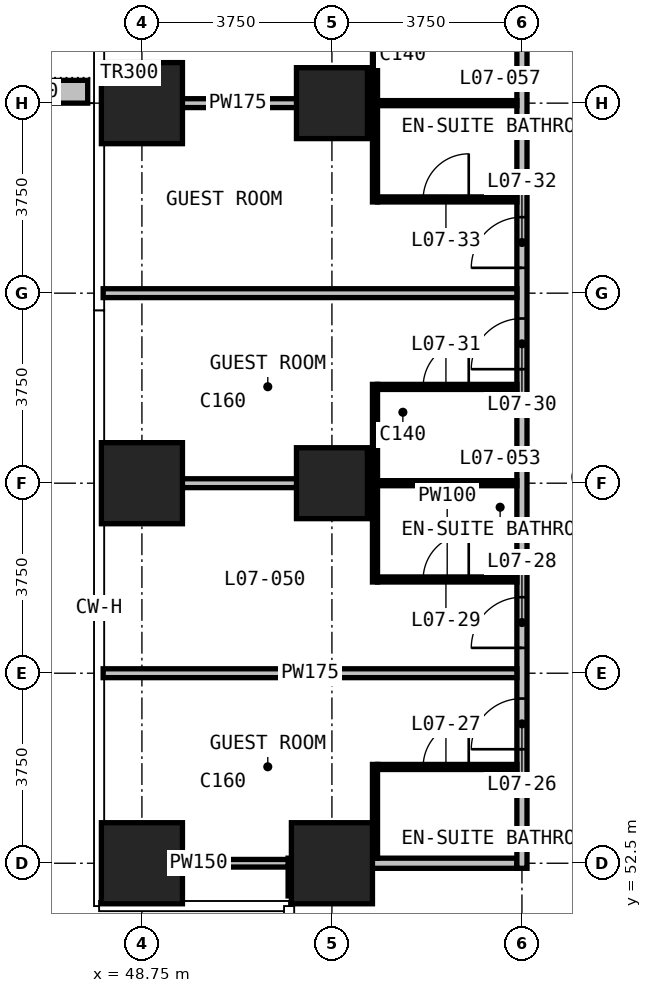
"""IFC4 building model, lengths in metres.
Left out: names, types, materials, properties, quantities, classifications, styles, units other than length and angle.
Written with IfcOpenShell. Run it as: python <this file> out.ifc"""

import sys

from ifc_helpers import new_model, si_unit, direction, frame, frame_2d, origin, origin_2d, place, context, subcontext, project, spatial, rectangle, extrude, element, fill, save


model = new_model("IFC4")
c1 = context("Model", 3, precision=1e-05, world=origin(), true_north=direction((0.0, 1.0)))
c2 = subcontext(c1, "Body", "Model", "MODEL_VIEW")
j1 = project(units=[si_unit("LENGTHUNIT", "METRE"), si_unit("PLANEANGLEUNIT", "RADIAN")], contexts=[c1])
p1 = place(None, origin())
s1 = spatial("IfcSite", under=j1, at=p1, CompositionType="ELEMENT")
p2 = place(p1, origin())
s2 = spatial("IfcBuilding", under=s1, at=p2, CompositionType="ELEMENT")
p3 = place(p2, frame((0.0, 0.0, 42.8)))
s3 = spatial("IfcBuildingStorey", under=s2, at=p3, CompositionType="ELEMENT", Elevation=42.8)
for number, where, z_axis, x_axis in (
    (1, (48.75, 52.5, 0.0), (0.0, 0.0, 1.0), (1.0, 0.0, 0.0)),
    (2, (48.75, 60.0, 0.0), (0.0, 0.0, 1.0), (1.0, 0.0, 0.0)),
    (3, (48.75, 67.5, 0.0), (0.0, 0.0, 1.0), (1.0, 0.0, 0.0)),
    (4, (52.5, 52.5, 0.0), (0.0, 0.0, 1.0), (1.0, 0.0, 0.0)),
):
    element("IfcColumn", number, at=place(p3, frame(where, z_axis=z_axis, x_axis=x_axis)), inside=s3, PredefinedType="COLUMN", context=c2, shape_type="SweptSolid", body=[
        extrude(rectangle(XDim=1.6, YDim=1.6, at=origin_2d()), origin(), (0.0, 0.0, 1.0), 3.3),
    ])
for number, where, z_axis, x_axis in (
    (5, (52.5, 60.0, 0.0), (0.0, 0.0, 1.0), (1.0, 0.0, 0.0)),
    (6, (52.5, 67.5, 0.0), (0.0, 0.0, 1.0), (1.0, 0.0, 0.0)),
):
    element("IfcColumn", number, at=place(p3, frame(where, z_axis=z_axis, x_axis=x_axis)), inside=s3, PredefinedType="COLUMN", context=c2, shape_type="SweptSolid", body=[
        extrude(rectangle(XDim=1.4, YDim=1.4, at=origin_2d()), origin(), (0.0, 0.0, 1.0), 3.3),
    ])
p4 = place(p3, frame((47.68, 67.725, 0.0), z_axis=(0.0, 0.0, 1.0), x_axis=(-1.0, 0.0, 0.0)))
e7 = element("IfcWall", 7, at=p4, inside=s3, PredefinedType="USERDEFINED", context=c2, shape_type="SweptSolid", body=[
    extrude(rectangle(XDim=2.33, YDim=0.45, at=frame_2d((1.165, 0.0))), origin(), (0.0, 0.0, 1.0), 1.1),
])
p5 = place(p3, frame((51.835, 52.5, 0.0), z_axis=(0.0, 0.0, 1.0), x_axis=(1.0, 0.0, 0.0)))
e8 = element("IfcWall", 8, at=p5, inside=s3, PredefinedType="PARTITIONING", context=c2, shape_type="SweptSolid", body=[
    extrude(rectangle(XDim=4.315, YDim=0.2, at=frame_2d((2.157, 0.0))), origin(), (0.0, 0.0, 1.0), 3.0),
])
p6 = place(p3, frame((51.735, 51.855, 0.0), z_axis=(0.0, 0.0, 1.0), x_axis=(0.0, 1.0, 0.0)))
e9 = element("IfcWall", 9, at=p6, inside=s3, PredefinedType="PARTITIONING", context=c2, shape_type="SweptSolid", body=[
    extrude(rectangle(XDim=0.745, YDim=0.2, at=frame_2d((0.373, 0.0))), origin(), (0.0, 0.0, 1.0), 3.0),
])
p7 = place(p3, frame((56.25, 52.4, 0.0), z_axis=(0.0, 0.0, 1.0), x_axis=(0.0, 1.0, 0.0)))
e10 = element("IfcWall", 10, at=p7, inside=s3, PredefinedType="PARTITIONING", context=c2, shape_type="SweptSolid", body=[
    extrude(rectangle(XDim=33.925, YDim=0.2, at=frame_2d((16.962, 0.0))), origin(), (0.0, 0.0, 1.0), 3.0),
])
p8 = place(p7, frame((2.35, 0.0, 0.0)))
e11 = element("IfcOpeningElement", 11, at=p8, cuts=e10, PredefinedType="OPENING", context=c2, shape_type="SweptSolid", body=[
    extrude(rectangle(XDim=1.0, YDim=2.2, at=frame_2d((0.5, 1.1))), frame((0.0, 0.11, 0.0), z_axis=(0.0, -1.0, 0.0), x_axis=(1.0, 0.0, 0.0)), (0.0, 0.0, 1.0), 0.22),
])
p9 = place(p7, frame((4.35, 0.0, 0.0)))
e12 = element("IfcOpeningElement", 12, at=p9, cuts=e10, PredefinedType="OPENING", context=c2, shape_type="SweptSolid", body=[
    extrude(rectangle(XDim=1.0, YDim=2.2, at=frame_2d((0.5, 1.1))), frame((0.0, 0.11, 0.0), z_axis=(0.0, -1.0, 0.0), x_axis=(1.0, 0.0, 0.0)), (0.0, 0.0, 1.0), 0.22),
])
p10 = place(p7, frame((9.85, 0.0, 0.0)))
e13 = element("IfcOpeningElement", 13, at=p10, cuts=e10, PredefinedType="OPENING", context=c2, shape_type="SweptSolid", body=[
    extrude(rectangle(XDim=1.0, YDim=2.2, at=frame_2d((0.5, 1.1))), frame((0.0, 0.11, 0.0), z_axis=(0.0, -1.0, 0.0), x_axis=(1.0, 0.0, 0.0)), (0.0, 0.0, 1.0), 0.22),
])
p11 = place(p7, frame((11.85, 0.0, 0.0)))
e14 = element("IfcOpeningElement", 14, at=p11, cuts=e10, PredefinedType="OPENING", context=c2, shape_type="SweptSolid", body=[
    extrude(rectangle(XDim=1.0, YDim=2.2, at=frame_2d((0.5, 1.1))), frame((0.0, 0.11, 0.0), z_axis=(0.0, -1.0, 0.0), x_axis=(1.0, 0.0, 0.0)), (0.0, 0.0, 1.0), 0.22),
])
p12 = place(p7, frame((17.35, 0.0, 0.0)))
e15 = element("IfcOpeningElement", 15, at=p12, cuts=e10, PredefinedType="OPENING", context=c2, shape_type="SweptSolid", body=[
    extrude(rectangle(XDim=1.0, YDim=2.2, at=frame_2d((0.5, 1.1))), frame((0.0, 0.11, 0.0), z_axis=(0.0, -1.0, 0.0), x_axis=(1.0, 0.0, 0.0)), (0.0, 0.0, 1.0), 0.22),
])
p13 = place(p7, frame((19.35, 0.0, 0.0)))
e16 = element("IfcOpeningElement", 16, at=p13, cuts=e10, PredefinedType="OPENING", context=c2, shape_type="SweptSolid", body=[
    extrude(rectangle(XDim=1.0, YDim=2.2, at=frame_2d((0.5, 1.1))), frame((0.0, 0.11, 0.0), z_axis=(0.0, -1.0, 0.0), x_axis=(1.0, 0.0, 0.0)), (0.0, 0.0, 1.0), 0.22),
])
p14 = place(p7, frame((24.85, 0.0, 0.0)))
e17 = element("IfcOpeningElement", 17, at=p14, cuts=e10, PredefinedType="OPENING", context=c2, shape_type="SweptSolid", body=[
    extrude(rectangle(XDim=1.0, YDim=2.2, at=frame_2d((0.5, 1.1))), frame((0.0, 0.11, 0.0), z_axis=(0.0, -1.0, 0.0), x_axis=(1.0, 0.0, 0.0)), (0.0, 0.0, 1.0), 0.22),
])
p15 = place(p7, frame((26.85, 0.0, 0.0)))
e18 = element("IfcOpeningElement", 18, at=p15, cuts=e10, PredefinedType="OPENING", context=c2, shape_type="SweptSolid", body=[
    extrude(rectangle(XDim=1.0, YDim=2.2, at=frame_2d((0.5, 1.1))), frame((0.0, 0.11, 0.0), z_axis=(0.0, -1.0, 0.0), x_axis=(1.0, 0.0, 0.0)), (0.0, 0.0, 1.0), 0.22),
])
p16 = place(p7, frame((31.55, 0.0, 0.0)))
e19 = element("IfcOpeningElement", 19, at=p16, cuts=e10, PredefinedType="OPENING", context=c2, shape_type="SweptSolid", body=[
    extrude(rectangle(XDim=0.9, YDim=2.2, at=frame_2d((0.45, 1.1))), frame((0.0, 0.11, 0.0), z_axis=(0.0, -1.0, 0.0), x_axis=(1.0, 0.0, 0.0)), (0.0, 0.0, 1.0), 0.22),
])
p17 = place(p3, frame((47.985, 56.25, 0.0), z_axis=(0.0, 0.0, 1.0), x_axis=(1.0, 0.0, 0.0)))
e20 = element("IfcWall", 20, at=p17, inside=s3, PredefinedType="PARTITIONING", context=c2, shape_type="SweptSolid", body=[
    extrude(rectangle(XDim=8.165, YDim=0.175, at=frame_2d((4.083, 0.0))), origin(), (0.0, 0.0, 1.0), 3.0),
])
p18 = place(p3, frame((47.985, 60.0, 0.0), z_axis=(0.0, 0.0, 1.0), x_axis=(1.0, 0.0, 0.0)))
e21 = element("IfcWall", 21, at=p18, inside=s3, PredefinedType="PARTITIONING", context=c2, shape_type="SweptSolid", body=[
    extrude(rectangle(XDim=5.315, YDim=0.175, at=frame_2d((2.657, 0.0))), origin(), (0.0, 0.0, 1.0), 3.0),
])
p19 = place(p3, frame((47.985, 63.75, 0.0), z_axis=(0.0, 0.0, 1.0), x_axis=(1.0, 0.0, 0.0)))
e22 = element("IfcWall", 22, at=p19, inside=s3, PredefinedType="PARTITIONING", context=c2, shape_type="SweptSolid", body=[
    extrude(rectangle(XDim=8.165, YDim=0.175, at=frame_2d((4.083, 0.0))), origin(), (0.0, 0.0, 1.0), 3.0),
])
p20 = place(p3, frame((47.985, 67.5, 0.0), z_axis=(0.0, 0.0, 1.0), x_axis=(1.0, 0.0, 0.0)))
e23 = element("IfcWall", 23, at=p20, inside=s3, PredefinedType="PARTITIONING", context=c2, shape_type="SweptSolid", body=[
    extrude(rectangle(XDim=5.315, YDim=0.175, at=frame_2d((2.657, 0.0))), origin(), (0.0, 0.0, 1.0), 3.0),
])
p21 = place(p3, frame((48.105, 52.5, 0.0), z_axis=(0.0, 0.0, 1.0), x_axis=(1.0, 0.0, 0.0)))
e24 = element("IfcWall", 24, at=p21, inside=s3, PredefinedType="PARTITIONING", context=c2, shape_type="SweptSolid", body=[
    extrude(rectangle(XDim=3.53, YDim=0.15, at=frame_2d((1.765, 0.0))), origin(), (0.0, 0.0, 1.0), 3.0),
])
p22 = place(p3, frame((53.4, 54.4, 0.0), z_axis=(0.0, 0.0, 1.0), x_axis=(1.0, 0.0, 0.0)))
e25 = element("IfcWall", 25, at=p22, inside=s3, PredefinedType="PARTITIONING", context=c2, shape_type="SweptSolid", body=[
    extrude(rectangle(XDim=2.75, YDim=0.1, at=frame_2d((1.375, 0.0))), origin(), (0.0, 0.0, 1.0), 3.0),
])
p23 = place(p22, frame((0.9, 0.0, 0.0)))
e26 = element("IfcOpeningElement", 26, at=p23, cuts=e25, PredefinedType="OPENING", context=c2, shape_type="SweptSolid", body=[
    extrude(rectangle(XDim=0.9, YDim=2.2, at=frame_2d((0.45, 1.1))), frame((0.0, 0.06, 0.0), z_axis=(0.0, -1.0, 0.0), x_axis=(1.0, 0.0, 0.0)), (0.0, 0.0, 1.0), 0.12),
])
p24 = place(p3, frame((53.4, 58.1, 0.0), z_axis=(0.0, 0.0, 1.0), x_axis=(1.0, 0.0, 0.0)))
e27 = element("IfcWall", 27, at=p24, inside=s3, PredefinedType="PARTITIONING", context=c2, shape_type="SweptSolid", body=[
    extrude(rectangle(XDim=2.75, YDim=0.1, at=frame_2d((1.375, 0.0))), origin(), (0.0, 0.0, 1.0), 3.0),
])
p25 = place(p24, frame((0.9, 0.0, 0.0)))
e28 = element("IfcOpeningElement", 28, at=p25, cuts=e27, PredefinedType="OPENING", context=c2, shape_type="SweptSolid", body=[
    extrude(rectangle(XDim=0.9, YDim=2.2, at=frame_2d((0.45, 1.1))), frame((0.0, 0.06, 0.0), z_axis=(0.0, -1.0, 0.0), x_axis=(1.0, 0.0, 0.0)), (0.0, 0.0, 1.0), 0.12),
])
p26 = place(p3, frame((53.4, 60.0, 0.0), z_axis=(0.0, 0.0, 1.0), x_axis=(1.0, 0.0, 0.0)))
e29 = element("IfcWall", 29, at=p26, inside=s3, PredefinedType="PARTITIONING", context=c2, shape_type="SweptSolid", body=[
    extrude(rectangle(XDim=2.75, YDim=0.1, at=frame_2d((1.375, 0.0))), origin(), (0.0, 0.0, 1.0), 3.0),
])
p27 = place(p3, frame((53.4, 61.9, 0.0), z_axis=(0.0, 0.0, 1.0), x_axis=(1.0, 0.0, 0.0)))
e30 = element("IfcWall", 30, at=p27, inside=s3, PredefinedType="PARTITIONING", context=c2, shape_type="SweptSolid", body=[
    extrude(rectangle(XDim=2.75, YDim=0.1, at=frame_2d((1.375, 0.0))), origin(), (0.0, 0.0, 1.0), 3.0),
])
p28 = place(p27, frame((0.9, 0.0, 0.0)))
e31 = element("IfcOpeningElement", 31, at=p28, cuts=e30, PredefinedType="OPENING", context=c2, shape_type="SweptSolid", body=[
    extrude(rectangle(XDim=0.9, YDim=2.2, at=frame_2d((0.45, 1.1))), frame((0.0, 0.06, 0.0), z_axis=(0.0, -1.0, 0.0), x_axis=(1.0, 0.0, 0.0)), (0.0, 0.0, 1.0), 0.12),
])
p29 = place(p3, frame((53.4, 65.6, 0.0), z_axis=(0.0, 0.0, 1.0), x_axis=(1.0, 0.0, 0.0)))
e32 = element("IfcWall", 32, at=p29, inside=s3, PredefinedType="PARTITIONING", context=c2, shape_type="SweptSolid", body=[
    extrude(rectangle(XDim=2.75, YDim=0.1, at=frame_2d((1.375, 0.0))), origin(), (0.0, 0.0, 1.0), 3.0),
])
p30 = place(p29, frame((0.9, 0.0, 0.0)))
e33 = element("IfcOpeningElement", 33, at=p30, cuts=e32, PredefinedType="OPENING", context=c2, shape_type="SweptSolid", body=[
    extrude(rectangle(XDim=0.9, YDim=2.2, at=frame_2d((0.45, 1.1))), frame((0.0, 0.06, 0.0), z_axis=(0.0, -1.0, 0.0), x_axis=(1.0, 0.0, 0.0)), (0.0, 0.0, 1.0), 0.12),
])
p31 = place(p3, frame((53.4, 67.5, 0.0), z_axis=(0.0, 0.0, 1.0), x_axis=(1.0, 0.0, 0.0)))
e34 = element("IfcWall", 34, at=p31, inside=s3, PredefinedType="PARTITIONING", context=c2, shape_type="SweptSolid", body=[
    extrude(rectangle(XDim=2.75, YDim=0.1, at=frame_2d((1.375, 0.0))), origin(), (0.0, 0.0, 1.0), 3.0),
])
p32 = place(p3, frame((53.35, 52.6, 0.0), z_axis=(0.0, 0.0, 1.0), x_axis=(0.0, 1.0, 0.0)))
e35 = element("IfcWall", 35, at=p32, inside=s3, PredefinedType="PARTITIONING", context=c2, shape_type="SweptSolid", body=[
    extrude(rectangle(XDim=1.85, YDim=0.1, at=frame_2d((0.925, 0.0))), origin(), (0.0, 0.0, 1.0), 3.0),
])
for number, where, z_axis, x_axis in (
    (36, (53.35, 58.05, 0.0), (0.0, 0.0, 1.0), (0.0, 1.0, 0.0)),
    (37, (53.35, 65.55, 0.0), (0.0, 0.0, 1.0), (0.0, 1.0, 0.0)),
):
    element("IfcWall", number, at=place(p3, frame(where, z_axis=z_axis, x_axis=x_axis)), inside=s3, PredefinedType="PARTITIONING", context=c2, shape_type="SweptSolid", body=[
        extrude(rectangle(XDim=3.9, YDim=0.1, at=frame_2d((1.95, 0.0))), origin(), (0.0, 0.0, 1.0), 3.0),
    ])
p33 = place(p8, origin())
e38 = element("IfcDoor", 38, at=p33, inside=s3, OperationType="SINGLE_SWING_LEFT", PredefinedType="DOOR", context=c2, shape_type="SweptSolid", body=[
    extrude(rectangle(XDim=1.0, YDim=2.2, at=frame_2d((0.5, 1.1))), frame((0.0, 0.025, 0.0), z_axis=(0.0, -1.0, 0.0), x_axis=(1.0, 0.0, 0.0)), (0.0, 0.0, 1.0), 0.05),
])
fill(e11, e38)
p34 = place(p23, origin())
e39 = element("IfcDoor", 39, at=p34, inside=s3, OperationType="SINGLE_SWING_RIGHT", PredefinedType="DOOR", context=c2, shape_type="SweptSolid", body=[
    extrude(rectangle(XDim=0.9, YDim=2.2, at=frame_2d((0.45, 1.1))), frame((0.0, 0.025, 0.0), z_axis=(0.0, -1.0, 0.0), x_axis=(1.0, 0.0, 0.0)), (0.0, 0.0, 1.0), 0.05),
])
fill(e26, e39)
p35 = place(p9, origin())
e40 = element("IfcDoor", 40, at=p35, inside=s3, OperationType="SINGLE_SWING_RIGHT", PredefinedType="DOOR", context=c2, shape_type="SweptSolid", body=[
    extrude(rectangle(XDim=1.0, YDim=2.2, at=frame_2d((0.5, 1.1))), frame((0.0, 0.025, 0.0), z_axis=(0.0, -1.0, 0.0), x_axis=(1.0, 0.0, 0.0)), (0.0, 0.0, 1.0), 0.05),
])
fill(e12, e40)
p36 = place(p25, origin())
e41 = element("IfcDoor", 41, at=p36, inside=s3, OperationType="SINGLE_SWING_RIGHT", PredefinedType="DOOR", context=c2, shape_type="SweptSolid", body=[
    extrude(rectangle(XDim=0.9, YDim=2.2, at=frame_2d((0.45, 1.1))), frame((0.0, 0.025, 0.0), z_axis=(0.0, -1.0, 0.0), x_axis=(1.0, 0.0, 0.0)), (0.0, 0.0, 1.0), 0.05),
])
fill(e28, e41)
p37 = place(p10, origin())
e42 = element("IfcDoor", 42, at=p37, inside=s3, OperationType="SINGLE_SWING_LEFT", PredefinedType="DOOR", context=c2, shape_type="SweptSolid", body=[
    extrude(rectangle(XDim=1.0, YDim=2.2, at=frame_2d((0.5, 1.1))), frame((0.0, 0.025, 0.0), z_axis=(0.0, -1.0, 0.0), x_axis=(1.0, 0.0, 0.0)), (0.0, 0.0, 1.0), 0.05),
])
fill(e13, e42)
p38 = place(p28, origin())
e43 = element("IfcDoor", 43, at=p38, inside=s3, OperationType="SINGLE_SWING_RIGHT", PredefinedType="DOOR", context=c2, shape_type="SweptSolid", body=[
    extrude(rectangle(XDim=0.9, YDim=2.2, at=frame_2d((0.45, 1.1))), frame((0.0, 0.025, 0.0), z_axis=(0.0, -1.0, 0.0), x_axis=(1.0, 0.0, 0.0)), (0.0, 0.0, 1.0), 0.05),
])
fill(e31, e43)
p39 = place(p11, origin())
e44 = element("IfcDoor", 44, at=p39, inside=s3, OperationType="SINGLE_SWING_LEFT", PredefinedType="DOOR", context=c2, shape_type="SweptSolid", body=[
    extrude(rectangle(XDim=1.0, YDim=2.2, at=frame_2d((0.5, 1.1))), frame((0.0, 0.025, 0.0), z_axis=(0.0, -1.0, 0.0), x_axis=(1.0, 0.0, 0.0)), (0.0, 0.0, 1.0), 0.05),
])
fill(e14, e44)
p40 = place(p30, origin())
e45 = element("IfcDoor", 45, at=p40, inside=s3, OperationType="SINGLE_SWING_RIGHT", PredefinedType="DOOR", context=c2, shape_type="SweptSolid", body=[
    extrude(rectangle(XDim=0.9, YDim=2.2, at=frame_2d((0.45, 1.1))), frame((0.0, 0.025, 0.0), z_axis=(0.0, -1.0, 0.0), x_axis=(1.0, 0.0, 0.0)), (0.0, 0.0, 1.0), 0.05),
])
fill(e33, e45)
save(model, sys.argv[1])
